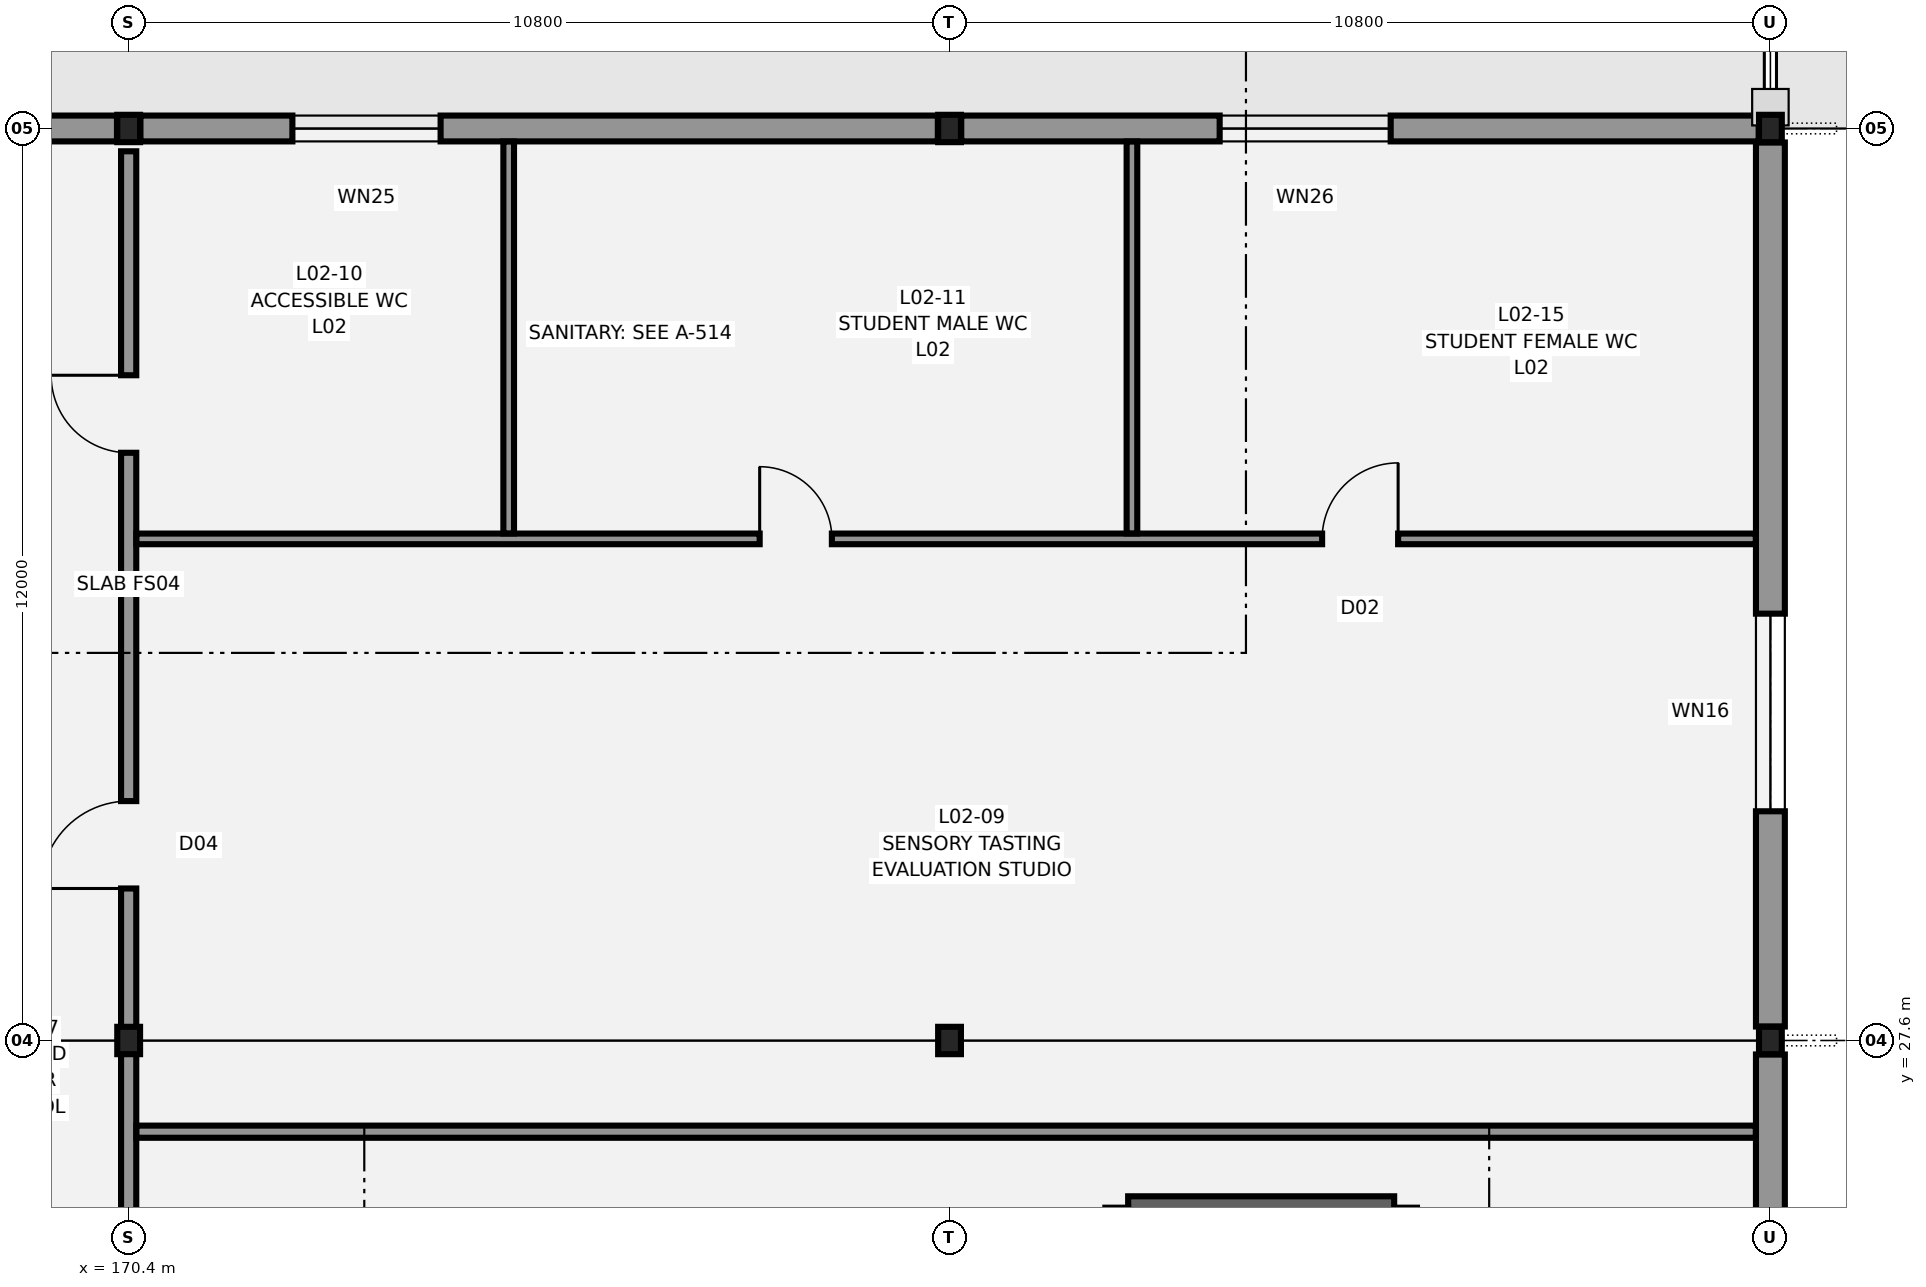
"""IFC4 building model, lengths in metres.
Left out: names, types, materials, properties, quantities, classifications, styles, units other than length and angle.
Written with IfcOpenShell. Run it as: python <this file> out.ifc"""

import sys

from ifc_helpers import new_model, si_unit, direction, frame, frame_2d, origin, origin_2d, place, context, subcontext, project, spatial, rectangle, i_section, extrude, element, fill, save


model = new_model("IFC4")
c1 = context("Model", 3, precision=1e-05, world=origin(), true_north=direction((0.0, 1.0)))
c2 = subcontext(c1, "Body", "Model", "MODEL_VIEW")
j1 = project(units=[si_unit("LENGTHUNIT", "METRE"), si_unit("PLANEANGLEUNIT", "RADIAN")], contexts=[c1])
p1 = place(None, origin())
s1 = spatial("IfcSite", under=j1, at=p1, CompositionType="ELEMENT")
p2 = place(p1, origin())
s2 = spatial("IfcBuilding", under=s1, at=p2, CompositionType="ELEMENT")
p3 = place(p2, frame((0.0, 0.0, 10.2)))
s3 = spatial("IfcBuildingStorey", under=s2, at=p3, CompositionType="ELEMENT", Elevation=10.2)
for number, where, z_axis, x_axis in (
    (1, (170.4, 27.6, 0.0), (0.0, 0.0, 1.0), (1.0, 0.0, 0.0)),
    (2, (170.4, 39.6, 0.0), (0.0, 0.0, 1.0), (1.0, 0.0, 0.0)),
    (3, (181.2, 27.6, 0.0), (0.0, 0.0, 1.0), (1.0, 0.0, 0.0)),
    (4, (181.2, 39.6, 0.0), (0.0, 0.0, 1.0), (1.0, 0.0, 0.0)),
    (5, (192.0, 27.6, 0.0), (0.0, 0.0, 1.0), (1.0, 0.0, 0.0)),
    (6, (192.0, 39.6, 0.0), (0.0, 0.0, 1.0), (1.0, 0.0, 0.0)),
):
    element("IfcColumn", number, at=place(p3, frame(where, z_axis=z_axis, x_axis=x_axis)), inside=s3, PredefinedType="COLUMN", context=c2, shape_type="SweptSolid", body=[
        extrude(i_section(OverallWidth=0.3, OverallDepth=0.36, WebThickness=0.012, FlangeThickness=0.022, FilletRadius=0.027, at=origin_2d()), origin(), (0.0, 0.0, 1.0), 4.2),
    ])
p4 = place(p3, frame((187.05, 25.4, 0.0), z_axis=(0.0, 0.0, 1.0), x_axis=(-1.0, 0.0, 0.0)))
e7 = element("IfcWall", 7, at=p4, inside=s3, PredefinedType="SHEAR", context=c2, shape_type="SweptSolid", body=[
    extrude(rectangle(XDim=3.5, YDim=0.3, at=frame_2d((1.75, 0.0))), origin(), (0.0, 0.0, 1.0), 3.89),
])
p5 = place(p3, frame((192.0, 27.416, 0.0), z_axis=(0.0, 0.0, 1.0), x_axis=(0.0, -1.0, 0.0)))
e8 = element("IfcWall", 8, at=p5, inside=s3, PredefinedType="STANDARD", context=c2, shape_type="SweptSolid", body=[
    extrude(rectangle(XDim=11.632, YDim=0.38, at=frame_2d((5.816, 0.0))), origin(), (0.0, 0.0, 1.0), 3.595),
])
p6 = place(p5, frame((3.2, 0.0, 0.8)))
e9 = element("IfcOpeningElement", 9, at=p6, cuts=e8, PredefinedType="OPENING", context=c2, shape_type="SweptSolid", body=[
    extrude(rectangle(XDim=2.8, YDim=2.1, at=frame_2d((1.4, 1.05))), frame((0.0, 0.2, 0.0), z_axis=(0.0, -1.0, 0.0), x_axis=(1.0, 0.0, 0.0)), (0.0, 0.0, 1.0), 0.4),
])
p7 = place(p3, frame((192.0, 39.416, 0.0), z_axis=(0.0, 0.0, 1.0), x_axis=(0.0, -1.0, 0.0)))
e10 = element("IfcWall", 10, at=p7, inside=s3, PredefinedType="STANDARD", context=c2, shape_type="SweptSolid", body=[
    extrude(rectangle(XDim=11.632, YDim=0.38, at=frame_2d((5.816, 0.0))), origin(), (0.0, 0.0, 1.0), 3.595),
])
p8 = place(p7, frame((6.2, 0.0, 0.8)))
e11 = element("IfcOpeningElement", 11, at=p8, cuts=e10, PredefinedType="OPENING", context=c2, shape_type="SweptSolid", body=[
    extrude(rectangle(XDim=2.6, YDim=1.4, at=frame_2d((1.3, 0.7))), frame((0.0, 0.2, 0.0), z_axis=(0.0, -1.0, 0.0), x_axis=(1.0, 0.0, 0.0)), (0.0, 0.0, 1.0), 0.4),
])
p9 = place(p3, frame((159.754, 39.6, 0.0), z_axis=(0.0, 0.0, 1.0), x_axis=(1.0, 0.0, 0.0)))
e12 = element("IfcWall", 12, at=p9, inside=s3, PredefinedType="STANDARD", context=c2, shape_type="SweptSolid", body=[
    extrude(rectangle(XDim=10.492, YDim=0.34, at=frame_2d((5.246, 0.0))), origin(), (0.0, 0.0, 1.0), 3.445),
])
p10 = place(p9, frame((3.4, 0.0, 0.8)))
e13 = element("IfcOpeningElement", 13, at=p10, cuts=e12, PredefinedType="OPENING", context=c2, shape_type="SweptSolid", body=[
    extrude(rectangle(XDim=2.0, YDim=1.6, at=frame_2d((1.0, 0.8))), frame((0.0, 0.18, 0.0), z_axis=(0.0, -1.0, 0.0), x_axis=(1.0, 0.0, 0.0)), (0.0, 0.0, 1.0), 0.36),
])
p11 = place(p3, frame((170.554, 39.6, 0.0), z_axis=(0.0, 0.0, 1.0), x_axis=(1.0, 0.0, 0.0)))
e14 = element("IfcWall", 14, at=p11, inside=s3, PredefinedType="STANDARD", context=c2, shape_type="SweptSolid", body=[
    extrude(rectangle(XDim=10.492, YDim=0.34, at=frame_2d((5.246, 0.0))), origin(), (0.0, 0.0, 1.0), 3.445),
])
p12 = place(p11, frame((2.0, 0.0, 0.8)))
e15 = element("IfcOpeningElement", 15, at=p12, cuts=e14, PredefinedType="OPENING", context=c2, shape_type="SweptSolid", body=[
    extrude(rectangle(XDim=1.95, YDim=1.75, at=frame_2d((0.975, 0.875))), frame((0.0, 0.18, 0.0), z_axis=(0.0, -1.0, 0.0), x_axis=(1.0, 0.0, 0.0)), (0.0, 0.0, 1.0), 0.36),
])
p13 = place(p3, frame((181.354, 39.6, 0.0), z_axis=(0.0, 0.0, 1.0), x_axis=(1.0, 0.0, 0.0)))
e16 = element("IfcWall", 16, at=p13, inside=s3, PredefinedType="STANDARD", context=c2, shape_type="SweptSolid", body=[
    extrude(rectangle(XDim=10.492, YDim=0.34, at=frame_2d((5.246, 0.0))), origin(), (0.0, 0.0, 1.0), 3.445),
])
p14 = place(p13, frame((3.4, 0.0, 0.8)))
e17 = element("IfcOpeningElement", 17, at=p14, cuts=e16, PredefinedType="OPENING", context=c2, shape_type="SweptSolid", body=[
    extrude(rectangle(XDim=2.25, YDim=1.75, at=frame_2d((1.125, 0.875))), frame((0.0, 0.18, 0.0), z_axis=(0.0, -1.0, 0.0), x_axis=(1.0, 0.0, 0.0)), (0.0, 0.0, 1.0), 0.36),
])
p15 = place(p3, frame((170.4, 6.8, 0.0), z_axis=(0.0, 0.0, 1.0), x_axis=(0.0, 1.0, 0.0)))
e18 = element("IfcWall", 18, at=p15, inside=s3, PredefinedType="PARTITIONING", context=c2, shape_type="SweptSolid", body=[
    extrude(rectangle(XDim=32.5, YDim=0.2, at=frame_2d((16.25, 0.0))), origin(), (0.0, 0.0, 1.0), 3.58),
])
p16 = place(p15, frame((3.2, 0.0, 0.0)))
e19 = element("IfcOpeningElement", 19, at=p16, cuts=e18, PredefinedType="OPENING", context=c2, shape_type="SweptSolid", body=[
    extrude(rectangle(XDim=1.05, YDim=2.15, at=frame_2d((0.525, 1.075))), frame((0.0, 0.11, 0.0), z_axis=(0.0, -1.0, 0.0), x_axis=(1.0, 0.0, 0.0)), (0.0, 0.0, 1.0), 0.22),
])
p17 = place(p15, frame((13.0, 0.0, 0.0)))
e20 = element("IfcOpeningElement", 20, at=p17, cuts=e18, PredefinedType="OPENING", context=c2, shape_type="SweptSolid", body=[
    extrude(rectangle(XDim=1.6, YDim=2.2, at=frame_2d((0.8, 1.1))), frame((0.0, 0.11, 0.0), z_axis=(0.0, -1.0, 0.0), x_axis=(1.0, 0.0, 0.0)), (0.0, 0.0, 1.0), 0.22),
])
p18 = place(p15, frame((22.8, 0.0, 0.0)))
e21 = element("IfcOpeningElement", 21, at=p18, cuts=e18, PredefinedType="OPENING", context=c2, shape_type="SweptSolid", body=[
    extrude(rectangle(XDim=1.15, YDim=2.15, at=frame_2d((0.575, 1.075))), frame((0.0, 0.11, 0.0), z_axis=(0.0, -1.0, 0.0), x_axis=(1.0, 0.0, 0.0)), (0.0, 0.0, 1.0), 0.22),
])
p19 = place(p15, frame((28.533, 0.0, 0.0)))
e22 = element("IfcOpeningElement", 22, at=p19, cuts=e18, PredefinedType="OPENING", context=c2, shape_type="SweptSolid", body=[
    extrude(rectangle(XDim=1.02, YDim=2.12, at=frame_2d((0.51, 1.06))), frame((0.0, 0.11, 0.0), z_axis=(0.0, -1.0, 0.0), x_axis=(1.0, 0.0, 0.0)), (0.0, 0.0, 1.0), 0.22),
])
p20 = place(p3, frame((170.502, 26.4, 0.0), z_axis=(0.0, 0.0, 1.0), x_axis=(1.0, 0.0, 0.0)))
e23 = element("IfcWall", 23, at=p20, inside=s3, PredefinedType="PARTITIONING", context=c2, shape_type="SweptSolid", body=[
    extrude(rectangle(XDim=21.306, YDim=0.16, at=frame_2d((10.653, 0.0))), origin(), (0.0, 0.0, 1.0), 3.58),
])
p21 = place(p3, frame((170.502, 34.2, 0.0), z_axis=(0.0, 0.0, 1.0), x_axis=(1.0, 0.0, 0.0)))
e24 = element("IfcWall", 24, at=p21, inside=s3, PredefinedType="PARTITIONING", context=c2, shape_type="SweptSolid", body=[
    extrude(rectangle(XDim=21.306, YDim=0.14, at=frame_2d((10.653, 0.0))), origin(), (0.0, 0.0, 1.0), 3.58),
])
p22 = place(p21, frame((8.2, 0.0, 0.0)))
e25 = element("IfcOpeningElement", 25, at=p22, cuts=e24, PredefinedType="OPENING", context=c2, shape_type="SweptSolid", body=[
    extrude(rectangle(XDim=0.95, YDim=2.1, at=frame_2d((0.475, 1.05))), frame((0.0, 0.08, 0.0), z_axis=(0.0, -1.0, 0.0), x_axis=(1.0, 0.0, 0.0)), (0.0, 0.0, 1.0), 0.16),
])
p23 = place(p21, frame((15.6, 0.0, 0.0)))
e26 = element("IfcOpeningElement", 26, at=p23, cuts=e24, PredefinedType="OPENING", context=c2, shape_type="SweptSolid", body=[
    extrude(rectangle(XDim=1.0, YDim=2.1, at=frame_2d((0.5, 1.05))), frame((0.0, 0.08, 0.0), z_axis=(0.0, -1.0, 0.0), x_axis=(1.0, 0.0, 0.0)), (0.0, 0.0, 1.0), 0.16),
])
for number, where, z_axis, x_axis in (
    (27, (175.4, 34.272, 0.0), (0.0, 0.0, 1.0), (0.0, 1.0, 0.0)),
    (28, (183.6, 34.272, 0.0), (0.0, 0.0, 1.0), (0.0, 1.0, 0.0)),
):
    element("IfcWall", number, at=place(p3, frame(where, z_axis=z_axis, x_axis=x_axis)), inside=s3, PredefinedType="PARTITIONING", context=c2, shape_type="SweptSolid", body=[
        extrude(rectangle(XDim=5.156, YDim=0.14, at=frame_2d((2.578, 0.0))), origin(), (0.0, 0.0, 1.0), 3.58),
    ])
p24 = place(p8, origin())
e29 = element("IfcWindow", 29, at=p24, inside=s3, PartitioningType="SINGLE_PANEL", PredefinedType="WINDOW", context=c2, shape_type="SweptSolid", body=[
    extrude(rectangle(XDim=2.6, YDim=1.4, at=frame_2d((1.3, 0.7))), frame((0.0, 0.03, 0.0), z_axis=(0.0, -1.0, 0.0), x_axis=(1.0, 0.0, 0.0)), (0.0, 0.0, 1.0), 0.06),
])
fill(e11, e29)
p25 = place(p12, origin())
e30 = element("IfcWindow", 30, at=p25, inside=s3, PartitioningType="SINGLE_PANEL", PredefinedType="WINDOW", context=c2, shape_type="SweptSolid", body=[
    extrude(rectangle(XDim=1.95, YDim=1.75, at=frame_2d((0.975, 0.875))), frame((0.0, 0.03, 0.0), z_axis=(0.0, -1.0, 0.0), x_axis=(1.0, 0.0, 0.0)), (0.0, 0.0, 1.0), 0.06),
])
fill(e15, e30)
p26 = place(p14, origin())
e31 = element("IfcWindow", 31, at=p26, inside=s3, PartitioningType="SINGLE_PANEL", PredefinedType="WINDOW", context=c2, shape_type="SweptSolid", body=[
    extrude(rectangle(XDim=2.25, YDim=1.75, at=frame_2d((1.125, 0.875))), frame((0.0, 0.03, 0.0), z_axis=(0.0, -1.0, 0.0), x_axis=(1.0, 0.0, 0.0)), (0.0, 0.0, 1.0), 0.06),
])
fill(e17, e31)
p27 = place(p18, origin())
e32 = element("IfcDoor", 32, at=p27, inside=s3, OperationType="SINGLE_SWING_LEFT", PredefinedType="DOOR", context=c2, shape_type="SweptSolid", body=[
    extrude(rectangle(XDim=1.15, YDim=2.15, at=frame_2d((0.575, 1.075))), frame((0.0, 0.025, 0.0), z_axis=(0.0, -1.0, 0.0), x_axis=(1.0, 0.0, 0.0)), (0.0, 0.0, 1.0), 0.05),
])
fill(e21, e32)
p28 = place(p19, origin())
e33 = element("IfcDoor", 33, at=p28, inside=s3, OperationType="SINGLE_SWING_RIGHT", PredefinedType="DOOR", context=c2, shape_type="SweptSolid", body=[
    extrude(rectangle(XDim=1.02, YDim=2.12, at=frame_2d((0.51, 1.06))), frame((0.0, 0.025, 0.0), z_axis=(0.0, -1.0, 0.0), x_axis=(1.0, 0.0, 0.0)), (0.0, 0.0, 1.0), 0.05),
])
fill(e22, e33)
p29 = place(p22, origin())
e34 = element("IfcDoor", 34, at=p29, inside=s3, OperationType="SINGLE_SWING_LEFT", PredefinedType="DOOR", context=c2, shape_type="SweptSolid", body=[
    extrude(rectangle(XDim=0.95, YDim=2.1, at=frame_2d((0.475, 1.05))), frame((0.0, 0.025, 0.0), z_axis=(0.0, -1.0, 0.0), x_axis=(1.0, 0.0, 0.0)), (0.0, 0.0, 1.0), 0.05),
])
fill(e25, e34)
p30 = place(p23, origin())
e35 = element("IfcDoor", 35, at=p30, inside=s3, OperationType="SINGLE_SWING_RIGHT", PredefinedType="DOOR", context=c2, shape_type="SweptSolid", body=[
    extrude(rectangle(XDim=1.0, YDim=2.1, at=frame_2d((0.5, 1.05))), frame((0.0, 0.025, 0.0), z_axis=(0.0, -1.0, 0.0), x_axis=(1.0, 0.0, 0.0)), (0.0, 0.0, 1.0), 0.05),
])
fill(e26, e35)
save(model, sys.argv[1])
